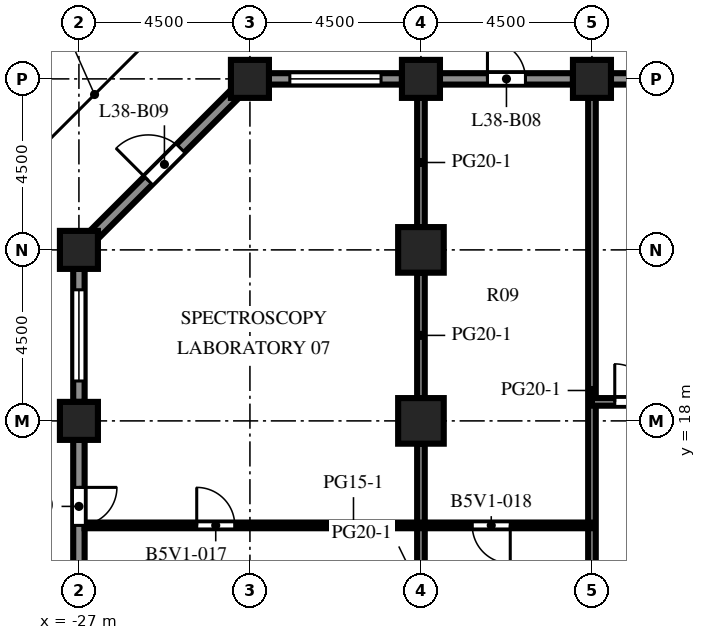
"""IFC4 building model, lengths in metres.
Left out: names, types, materials, properties, quantities, classifications, styles, units other than length and angle.
Written with IfcOpenShell. Run it as: python <this file> out.ifc"""

import sys

from ifc_helpers import new_model, si_unit, direction, frame, frame_2d, origin, origin_2d, place, context, subcontext, project, spatial, rectangle, extrude, element, fill, save


model = new_model("IFC4")
c1 = context("Model", 3, precision=1e-05, world=origin(), true_north=direction((0.0, 1.0)))
c2 = subcontext(c1, "Body", "Model", "MODEL_VIEW")
j1 = project(units=[si_unit("LENGTHUNIT", "METRE"), si_unit("PLANEANGLEUNIT", "RADIAN")], contexts=[c1])
p1 = place(None, origin())
s1 = spatial("IfcSite", under=j1, at=p1, CompositionType="ELEMENT")
p2 = place(p1, origin())
s2 = spatial("IfcBuilding", under=s1, at=p2, CompositionType="ELEMENT")
p3 = place(p2, frame((0.0, 0.0, 169.1)))
s3 = spatial("IfcBuildingStorey", under=s2, at=p3, CompositionType="ELEMENT", Elevation=169.1)
for number, where, z_axis, x_axis in (
    (1, (-27.0, 18.0, 0.0), (0.0, 0.0, 1.0), (1.0, 0.0, 0.0)),
    (2, (-27.0, 22.5, 0.0), (0.0, 0.0, 1.0), (1.0, 0.0, 0.0)),
    (3, (-22.5, 27.0, 0.0), (0.0, 0.0, 1.0), (1.0, 0.0, 0.0)),
    (4, (-18.0, 27.0, 0.0), (0.0, 0.0, 1.0), (1.0, 0.0, 0.0)),
    (5, (-13.5, 27.0, 0.0), (0.0, 0.0, 1.0), (1.0, 0.0, 0.0)),
):
    element("IfcColumn", number, at=place(p3, frame(where, z_axis=z_axis, x_axis=x_axis)), inside=s3, PredefinedType="COLUMN", context=c2, shape_type="SweptSolid", body=[
        extrude(rectangle(XDim=1.0, YDim=1.0, at=origin_2d()), origin(), (0.0, 0.0, 1.0), 4.1),
    ])
for number, where, z_axis, x_axis in (
    (6, (-18.0, 18.0, 0.0), (0.0, 0.0, 1.0), (1.0, 0.0, 0.0)),
    (7, (-18.0, 22.5, 0.0), (0.0, 0.0, 1.0), (1.0, 0.0, 0.0)),
):
    element("IfcColumn", number, at=place(p3, frame(where, z_axis=z_axis, x_axis=x_axis)), inside=s3, PredefinedType="COLUMN", context=c2, shape_type="SweptSolid", body=[
        extrude(rectangle(XDim=1.2, YDim=1.2, at=origin_2d()), origin(), (0.0, 0.0, 1.0), 4.1),
    ])
p4 = place(p3, frame((-13.0, 27.0, 0.0), z_axis=(0.0, 0.0, 1.0), x_axis=(1.0, 0.0, 0.0)))
e8 = element("IfcWall", 8, at=p4, inside=s3, PredefinedType="SOLIDWALL", context=c2, shape_type="SweptSolid", body=[
    extrude(rectangle(XDim=3.5, YDim=0.3, at=frame_2d((1.75, 0.0))), origin(), (0.0, 0.0, 1.0), 2.85),
])
p5 = place(p4, frame((0.55, 0.0, 0.8)))
e9 = element("IfcOpeningElement", 9, at=p5, cuts=e8, PredefinedType="OPENING", context=c2, shape_type="SweptSolid", body=[
    extrude(rectangle(XDim=2.4, YDim=1.7, at=frame_2d((1.2, 0.85))), frame((0.0, 0.16, 0.0), z_axis=(0.0, -1.0, 0.0), x_axis=(1.0, 0.0, 0.0)), (0.0, 0.0, 1.0), 0.32),
])
p6 = place(p3, frame((-17.5, 27.0, 0.0), z_axis=(0.0, 0.0, 1.0), x_axis=(1.0, 0.0, 0.0)))
e10 = element("IfcWall", 10, at=p6, inside=s3, PredefinedType="SOLIDWALL", context=c2, shape_type="SweptSolid", body=[
    extrude(rectangle(XDim=3.5, YDim=0.3, at=frame_2d((1.75, 0.0))), origin(), (0.0, 0.0, 1.0), 2.85),
])
p7 = place(p6, frame((1.25, 0.0, 0.0)))
e11 = element("IfcOpeningElement", 11, at=p7, cuts=e10, PredefinedType="OPENING", context=c2, shape_type="SweptSolid", body=[
    extrude(rectangle(XDim=1.0, YDim=2.2, at=frame_2d((0.5, 1.1))), frame((0.0, 0.16, 0.0), z_axis=(0.0, -1.0, 0.0), x_axis=(1.0, 0.0, 0.0)), (0.0, 0.0, 1.0), 0.32),
])
p8 = place(p3, frame((-22.0, 27.0, 0.0), z_axis=(0.0, 0.0, 1.0), x_axis=(1.0, 0.0, 0.0)))
e12 = element("IfcWall", 12, at=p8, inside=s3, PredefinedType="SOLIDWALL", context=c2, shape_type="SweptSolid", body=[
    extrude(rectangle(XDim=3.5, YDim=0.3, at=frame_2d((1.75, 0.0))), origin(), (0.0, 0.0, 1.0), 2.85),
])
p9 = place(p8, frame((0.55, 0.0, 0.8)))
e13 = element("IfcOpeningElement", 13, at=p9, cuts=e12, PredefinedType="OPENING", context=c2, shape_type="SweptSolid", body=[
    extrude(rectangle(XDim=2.4, YDim=1.7, at=frame_2d((1.2, 0.85))), frame((0.0, 0.16, 0.0), z_axis=(0.0, -1.0, 0.0), x_axis=(1.0, 0.0, 0.0)), (0.0, 0.0, 1.0), 0.32),
])
p10 = place(p3, frame((-26.606, 22.894, 0.0), z_axis=(0.0, 0.0, 1.0), x_axis=(0.707106781187, 0.707106781187, 0.0)))
e14 = element("IfcWall", 14, at=p10, inside=s3, PredefinedType="SOLIDWALL", context=c2, shape_type="SweptSolid", body=[
    extrude(rectangle(XDim=5.25, YDim=0.3, at=frame_2d((2.625, 0.0))), origin(), (0.0, 0.0, 1.0), 2.85),
])
p11 = place(p10, frame((2.025, 0.0, 0.0)))
e15 = element("IfcOpeningElement", 15, at=p11, cuts=e14, PredefinedType="OPENING", context=c2, shape_type="SweptSolid", body=[
    extrude(rectangle(XDim=1.2, YDim=2.2, at=frame_2d((0.6, 1.1))), frame((0.0, 0.16, 0.0), z_axis=(0.0, -1.0, 0.0), x_axis=(1.0, 0.0, 0.0)), (0.0, 0.0, 1.0), 0.32),
])
p12 = place(p3, frame((-27.0, 18.5, 0.0), z_axis=(0.0, 0.0, 1.0), x_axis=(0.0, 1.0, 0.0)))
e16 = element("IfcWall", 16, at=p12, inside=s3, PredefinedType="SOLIDWALL", context=c2, shape_type="SweptSolid", body=[
    extrude(rectangle(XDim=3.5, YDim=0.3, at=frame_2d((1.75, 0.0))), origin(), (0.0, 0.0, 1.0), 2.85),
])
p13 = place(p12, frame((0.55, 0.0, 0.8)))
e17 = element("IfcOpeningElement", 17, at=p13, cuts=e16, PredefinedType="OPENING", context=c2, shape_type="SweptSolid", body=[
    extrude(rectangle(XDim=2.4, YDim=1.7, at=frame_2d((1.2, 0.85))), frame((0.0, 0.16, 0.0), z_axis=(0.0, -1.0, 0.0), x_axis=(1.0, 0.0, 0.0)), (0.0, 0.0, 1.0), 0.32),
])
p14 = place(p3, frame((-27.0, 14.0, 0.0), z_axis=(0.0, 0.0, 1.0), x_axis=(0.0, 1.0, 0.0)))
e18 = element("IfcWall", 18, at=p14, inside=s3, PredefinedType="SOLIDWALL", context=c2, shape_type="SweptSolid", body=[
    extrude(rectangle(XDim=3.5, YDim=0.3, at=frame_2d((1.75, 0.0))), origin(), (0.0, 0.0, 1.0), 2.85),
])
p15 = place(p14, frame((1.25, 0.0, 0.0)))
e19 = element("IfcOpeningElement", 19, at=p15, cuts=e18, PredefinedType="OPENING", context=c2, shape_type="SweptSolid", body=[
    extrude(rectangle(XDim=1.0, YDim=2.2, at=frame_2d((0.5, 1.1))), frame((0.0, 0.16, 0.0), z_axis=(0.0, -1.0, 0.0), x_axis=(1.0, 0.0, 0.0)), (0.0, 0.0, 1.0), 0.32),
])
p16 = place(p3, frame((-18.0, 9.6, 0.0), z_axis=(0.0, 0.0, 1.0), x_axis=(0.0, 1.0, 0.0)))
e20 = element("IfcWall", 20, at=p16, inside=s3, PredefinedType="PARTITIONING", context=c2, shape_type="SweptSolid", body=[
    extrude(rectangle(XDim=7.8, YDim=0.2, at=frame_2d((3.9, 0.0))), origin(), (0.0, 0.0, 1.0), 3.65),
])
p17 = place(p3, frame((-18.0, 18.6, 0.0), z_axis=(0.0, 0.0, 1.0), x_axis=(0.0, 1.0, 0.0)))
e21 = element("IfcWall", 21, at=p17, inside=s3, PredefinedType="PARTITIONING", context=c2, shape_type="SweptSolid", body=[
    extrude(rectangle(XDim=3.3, YDim=0.2, at=frame_2d((1.65, 0.0))), origin(), (0.0, 0.0, 1.0), 3.65),
])
p18 = place(p3, frame((-18.0, 23.1, 0.0), z_axis=(0.0, 0.0, 1.0), x_axis=(0.0, 1.0, 0.0)))
e22 = element("IfcWall", 22, at=p18, inside=s3, PredefinedType="PARTITIONING", context=c2, shape_type="SweptSolid", body=[
    extrude(rectangle(XDim=3.4, YDim=0.2, at=frame_2d((1.7, 0.0))), origin(), (0.0, 0.0, 1.0), 3.65),
])
p19 = place(p3, frame((-13.5, 6.25, 0.0), z_axis=(0.0, 0.0, 1.0), x_axis=(0.0, 1.0, 0.0)))
e23 = element("IfcWall", 23, at=p19, inside=s3, PredefinedType="PARTITIONING", context=c2, shape_type="SweptSolid", body=[
    extrude(rectangle(XDim=20.25, YDim=0.2, at=frame_2d((10.125, 0.0))), origin(), (0.0, 0.0, 1.0), 3.65),
])
p20 = place(p19, frame((3.85, 0.0, 0.0)))
e24 = element("IfcOpeningElement", 24, at=p20, cuts=e23, PredefinedType="OPENING", context=c2, shape_type="SweptSolid", body=[
    extrude(rectangle(XDim=1.0, YDim=2.1, at=frame_2d((0.5, 1.05))), frame((0.0, 0.11, 0.0), z_axis=(0.0, -1.0, 0.0), x_axis=(1.0, 0.0, 0.0)), (0.0, 0.0, 1.0), 0.22),
])
p21 = place(p3, frame((-26.85, 15.25, 0.0), z_axis=(0.0, 0.0, 1.0), x_axis=(1.0, 0.0, 0.0)))
e25 = element("IfcWall", 25, at=p21, inside=s3, PredefinedType="PARTITIONING", context=c2, shape_type="SweptSolid", body=[
    extrude(rectangle(XDim=13.35, YDim=0.15, at=frame_2d((6.675, 0.0))), origin(), (0.0, 0.0, 1.0), 3.65),
])
p22 = place(p21, frame((2.95, 0.0, 0.0)))
e26 = element("IfcOpeningElement", 26, at=p22, cuts=e25, PredefinedType="OPENING", context=c2, shape_type="SweptSolid", body=[
    extrude(rectangle(XDim=1.0, YDim=2.1, at=frame_2d((0.5, 1.05))), frame((0.0, 0.085, 0.0), z_axis=(0.0, -1.0, 0.0), x_axis=(1.0, 0.0, 0.0)), (0.0, 0.0, 1.0), 0.17),
])
p23 = place(p21, frame((10.2, 0.0, 0.0)))
e27 = element("IfcOpeningElement", 27, at=p23, cuts=e25, PredefinedType="OPENING", context=c2, shape_type="SweptSolid", body=[
    extrude(rectangle(XDim=1.0, YDim=2.1, at=frame_2d((0.5, 1.05))), frame((0.0, 0.085, 0.0), z_axis=(0.0, -1.0, 0.0), x_axis=(1.0, 0.0, 0.0)), (0.0, 0.0, 1.0), 0.17),
])
p24 = place(p3, frame((-13.5, 18.5, 0.0), z_axis=(0.0, 0.0, 1.0), x_axis=(1.0, 0.0, 0.0)))
e28 = element("IfcWall", 28, at=p24, inside=s3, PredefinedType="PARTITIONING", context=c2, shape_type="SweptSolid", body=[
    extrude(rectangle(XDim=3.0, YDim=0.2, at=frame_2d((1.5, 0.0))), origin(), (0.0, 0.0, 1.0), 3.65),
])
p25 = place(p24, frame((0.6, 0.0, 0.0)))
e29 = element("IfcOpeningElement", 29, at=p25, cuts=e28, PredefinedType="OPENING", context=c2, shape_type="SweptSolid", body=[
    extrude(rectangle(XDim=1.0, YDim=2.1, at=frame_2d((0.5, 1.05))), frame((0.0, 0.11, 0.0), z_axis=(0.0, -1.0, 0.0), x_axis=(1.0, 0.0, 0.0)), (0.0, 0.0, 1.0), 0.22),
])
p26 = place(p7, origin())
e30 = element("IfcDoor", 30, at=p26, inside=s3, OperationType="SINGLE_SWING_LEFT", PredefinedType="DOOR", context=c2, shape_type="SweptSolid", body=[
    extrude(rectangle(XDim=1.0, YDim=2.2, at=frame_2d((0.5, 1.1))), frame((0.0, 0.025, 0.0), z_axis=(0.0, -1.0, 0.0), x_axis=(1.0, 0.0, 0.0)), (0.0, 0.0, 1.0), 0.05),
])
fill(e11, e30)
p27 = place(p9, origin())
e31 = element("IfcWindow", 31, at=p27, inside=s3, PartitioningType="SINGLE_PANEL", PredefinedType="WINDOW", context=c2, shape_type="SweptSolid", body=[
    extrude(rectangle(XDim=2.4, YDim=1.7, at=frame_2d((1.2, 0.85))), frame((0.0, 0.03, 0.0), z_axis=(0.0, -1.0, 0.0), x_axis=(1.0, 0.0, 0.0)), (0.0, 0.0, 1.0), 0.06),
])
fill(e13, e31)
p28 = place(p11, origin())
e32 = element("IfcDoor", 32, at=p28, inside=s3, OperationType="SINGLE_SWING_LEFT", PredefinedType="DOOR", context=c2, shape_type="SweptSolid", body=[
    extrude(rectangle(XDim=1.2, YDim=2.2, at=frame_2d((0.6, 1.1))), frame((0.0, 0.025, 0.0), z_axis=(0.0, -1.0, 0.0), x_axis=(1.0, 0.0, 0.0)), (0.0, 0.0, 1.0), 0.05),
])
fill(e15, e32)
p29 = place(p13, origin())
e33 = element("IfcWindow", 33, at=p29, inside=s3, PartitioningType="SINGLE_PANEL", PredefinedType="WINDOW", context=c2, shape_type="SweptSolid", body=[
    extrude(rectangle(XDim=2.4, YDim=1.7, at=frame_2d((1.2, 0.85))), frame((0.0, 0.03, 0.0), z_axis=(0.0, -1.0, 0.0), x_axis=(1.0, 0.0, 0.0)), (0.0, 0.0, 1.0), 0.06),
])
fill(e17, e33)
p30 = place(p15, origin())
e34 = element("IfcDoor", 34, at=p30, inside=s3, OperationType="SINGLE_SWING_RIGHT", PredefinedType="DOOR", context=c2, shape_type="SweptSolid", body=[
    extrude(rectangle(XDim=1.0, YDim=2.2, at=frame_2d((0.5, 1.1))), frame((0.0, 0.025, 0.0), z_axis=(0.0, -1.0, 0.0), x_axis=(1.0, 0.0, 0.0)), (0.0, 0.0, 1.0), 0.05),
])
fill(e19, e34)
p31 = place(p22, origin())
e35 = element("IfcDoor", 35, at=p31, inside=s3, OperationType="SINGLE_SWING_LEFT", PredefinedType="DOOR", context=c2, shape_type="SweptSolid", body=[
    extrude(rectangle(XDim=1.0, YDim=2.1, at=frame_2d((0.5, 1.05))), frame((0.0, 0.025, 0.0), z_axis=(0.0, -1.0, 0.0), x_axis=(1.0, 0.0, 0.0)), (0.0, 0.0, 1.0), 0.05),
])
fill(e26, e35)
p32 = place(p23, origin())
e36 = element("IfcDoor", 36, at=p32, inside=s3, OperationType="SINGLE_SWING_RIGHT", PredefinedType="DOOR", context=c2, shape_type="SweptSolid", body=[
    extrude(rectangle(XDim=1.0, YDim=2.1, at=frame_2d((0.5, 1.05))), frame((0.0, 0.025, 0.0), z_axis=(0.0, -1.0, 0.0), x_axis=(1.0, 0.0, 0.0)), (0.0, 0.0, 1.0), 0.05),
])
fill(e27, e36)
p33 = place(p25, origin())
e37 = element("IfcDoor", 37, at=p33, inside=s3, OperationType="SINGLE_SWING_LEFT", PredefinedType="DOOR", context=c2, shape_type="SweptSolid", body=[
    extrude(rectangle(XDim=1.0, YDim=2.1, at=frame_2d((0.5, 1.05))), frame((0.0, 0.025, 0.0), z_axis=(0.0, -1.0, 0.0), x_axis=(1.0, 0.0, 0.0)), (0.0, 0.0, 1.0), 0.05),
])
fill(e29, e37)
save(model, sys.argv[1])
